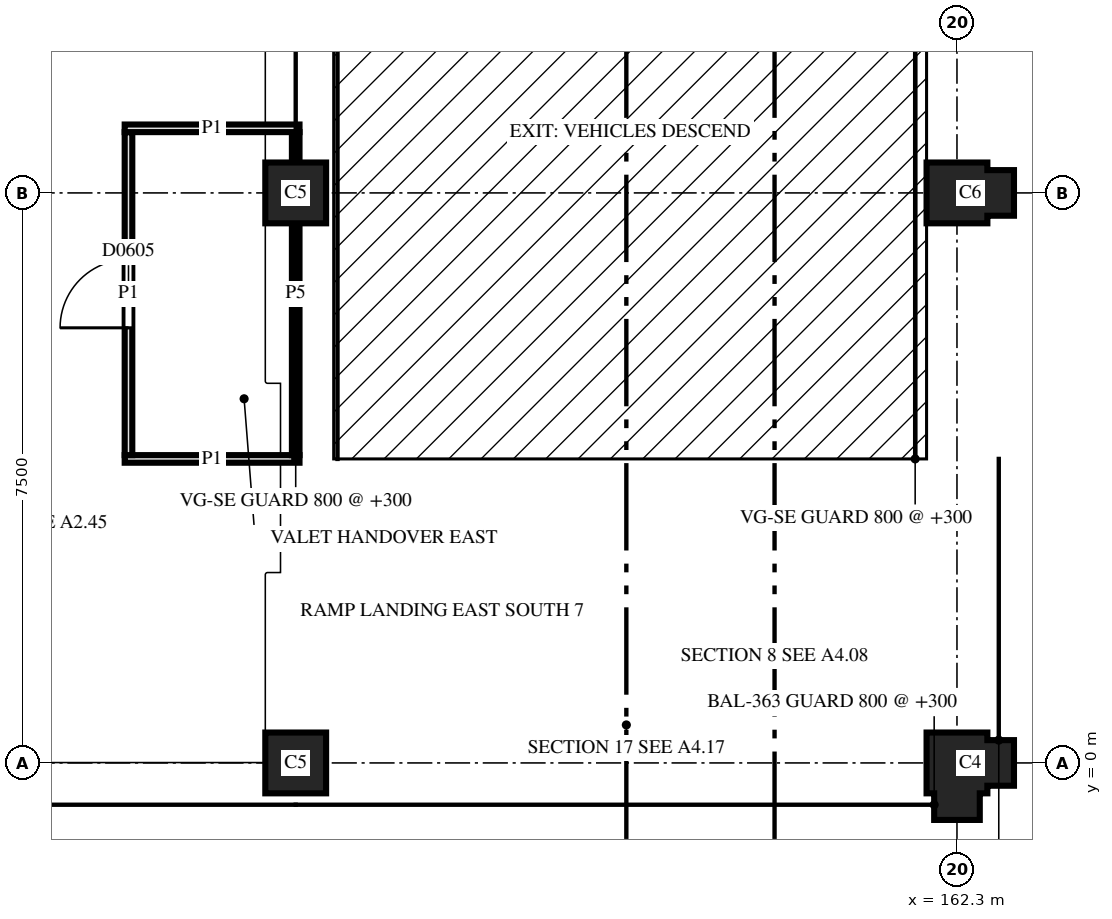
"""IFC4 building model, lengths in metres.
Left out: names, types, materials, properties, quantities, classifications, styles, units other than length and angle.
Written with IfcOpenShell. Run it as: python <this file> out.ifc"""

import sys

from ifc_helpers import new_model, si_unit, direction, frame, frame_2d, origin, place, context, subcontext, project, spatial, polyline, rectangle, outline, extrude, element, fill, save


model = new_model("IFC4")
c1 = context("Model", 3, precision=1e-05, world=origin(), true_north=direction((0.0, 1.0)))
c2 = subcontext(c1, "Body", "Model", "MODEL_VIEW")
j1 = project(units=[si_unit("LENGTHUNIT", "METRE"), si_unit("PLANEANGLEUNIT", "RADIAN")], contexts=[c1])
p1 = place(None, origin())
s1 = spatial("IfcSite", under=j1, at=p1, CompositionType="ELEMENT")
p2 = place(p1, origin())
s2 = spatial("IfcBuilding", under=s1, at=p2, CompositionType="ELEMENT")
p3 = place(p2, frame((0.0, 0.0, 23.0)))
s3 = spatial("IfcBuildingStorey", under=s2, at=p3, CompositionType="ELEMENT", Elevation=23.0)
p4 = place(p3, frame((153.6, 0.0, 0.0), z_axis=(0.0, 0.0, 1.0), x_axis=(1.0, 0.0, 0.0)))
e1 = element("IfcColumn", 1, at=p4, inside=s3, PredefinedType="COLUMN", context=c2, shape_type="SweptSolid", body=[
    extrude(outline(polyline([(-0.4, -0.4), (0.4, -0.4), (0.4, 0.4), (-0.4, 0.4), (-0.4, -0.4)])), origin(), (0.0, 0.0, 1.0), 3.7),
])
p5 = place(p3, frame((162.3, 0.0, 0.0), z_axis=(0.0, 0.0, 1.0), x_axis=(0.0, -1.0, 0.0)))
e2 = element("IfcColumn", 2, at=p5, inside=s3, PredefinedType="COLUMN", context=c2, shape_type="SweptSolid", body=[
    extrude(outline(polyline([(-0.4, -0.4), (0.4, -0.4), (0.4, -0.3), (0.75, -0.3), (0.75, 0.3), (0.4, 0.3), (0.4, 0.4), (0.3, 0.4), (0.3, 0.75), (-0.3, 0.75), (-0.3, 0.4), (-0.4, 0.4), (-0.4, -0.4)])), origin(), (0.0, 0.0, 1.0), 3.7),
])
p6 = place(p3, frame((153.6, 7.5, 0.0), z_axis=(0.0, 0.0, 1.0), x_axis=(1.0, 0.0, 0.0)))
e3 = element("IfcColumn", 3, at=p6, inside=s3, PredefinedType="COLUMN", context=c2, shape_type="SweptSolid", body=[
    extrude(outline(polyline([(-0.4, -0.4), (0.4, -0.4), (0.4, 0.4), (-0.4, 0.4), (-0.4, -0.4)])), origin(), (0.0, 0.0, 1.0), 3.7),
])
p7 = place(p3, frame((162.3, 7.5, 0.0), z_axis=(0.0, 0.0, 1.0), x_axis=(1.0, 0.0, 0.0)))
e4 = element("IfcColumn", 4, at=p7, inside=s3, PredefinedType="COLUMN", context=c2, shape_type="SweptSolid", body=[
    extrude(outline(polyline([(-0.4, -0.4), (0.4, -0.4), (0.4, -0.3), (0.75, -0.3), (0.75, 0.3), (0.4, 0.3), (0.4, 0.4), (-0.4, 0.4), (-0.4, -0.4)])), origin(), (0.0, 0.0, 1.0), 3.7),
])
p8 = place(p3, frame((151.35, 4.0, 0.0), z_axis=(0.0, 0.0, 1.0), x_axis=(1.0, 0.0, 0.0)))
e5 = element("IfcWall", 5, at=p8, inside=s3, PredefinedType="PARTITIONING", context=c2, shape_type="SweptSolid", body=[
    extrude(rectangle(XDim=2.3, YDim=0.1, at=frame_2d((1.15, 0.0))), origin(), (0.0, 0.0, 1.0), 2.88),
])
p9 = place(p3, frame((153.6, 4.05, 0.0), z_axis=(0.0, 0.0, 1.0), x_axis=(0.0, 1.0, 0.0)))
e6 = element("IfcWall", 6, at=p9, inside=s3, PredefinedType="PARTITIONING", context=c2, shape_type="SweptSolid", body=[
    extrude(rectangle(XDim=4.25, YDim=0.1, at=frame_2d((2.125, 0.0))), origin(), (0.0, 0.0, 1.0), 2.6),
])
p10 = place(p3, frame((151.4, 8.3, 0.0), z_axis=(0.0, 0.0, 1.0), x_axis=(0.0, -1.0, 0.0)))
e7 = element("IfcWall", 7, at=p10, inside=s3, PredefinedType="PARTITIONING", context=c2, shape_type="SweptSolid", body=[
    extrude(rectangle(XDim=4.25, YDim=0.1, at=frame_2d((2.125, 0.0))), origin(), (0.0, 0.0, 1.0), 2.88),
])
p11 = place(p10, frame((1.675, 0.0, 0.0)))
e8 = element("IfcOpeningElement", 8, at=p11, cuts=e7, PredefinedType="OPENING", context=c2, shape_type="SweptSolid", body=[
    extrude(rectangle(XDim=0.9, YDim=2.1, at=frame_2d((0.45, 1.05))), frame((0.0, 0.06, 0.0), z_axis=(0.0, -1.0, 0.0), x_axis=(1.0, 0.0, 0.0)), (0.0, 0.0, 1.0), 0.12),
])
p12 = place(p3, frame((153.65, 8.35, 0.0), z_axis=(0.0, 0.0, 1.0), x_axis=(-1.0, 0.0, 0.0)))
e9 = element("IfcWall", 9, at=p12, inside=s3, PredefinedType="PARTITIONING", context=c2, shape_type="SweptSolid", body=[
    extrude(rectangle(XDim=2.3, YDim=0.1, at=frame_2d((1.15, 0.0))), origin(), (0.0, 0.0, 1.0), 2.88),
])
p13 = place(p11, origin())
e10 = element("IfcDoor", 10, at=p13, inside=s3, OperationType="SINGLE_SWING_RIGHT", PredefinedType="DOOR", context=c2, shape_type="SweptSolid", body=[
    extrude(rectangle(XDim=0.9, YDim=2.1, at=frame_2d((0.45, 1.05))), frame((0.0, 0.025, 0.0), z_axis=(0.0, -1.0, 0.0), x_axis=(1.0, 0.0, 0.0)), (0.0, 0.0, 1.0), 0.05),
])
fill(e8, e10)
save(model, sys.argv[1])
